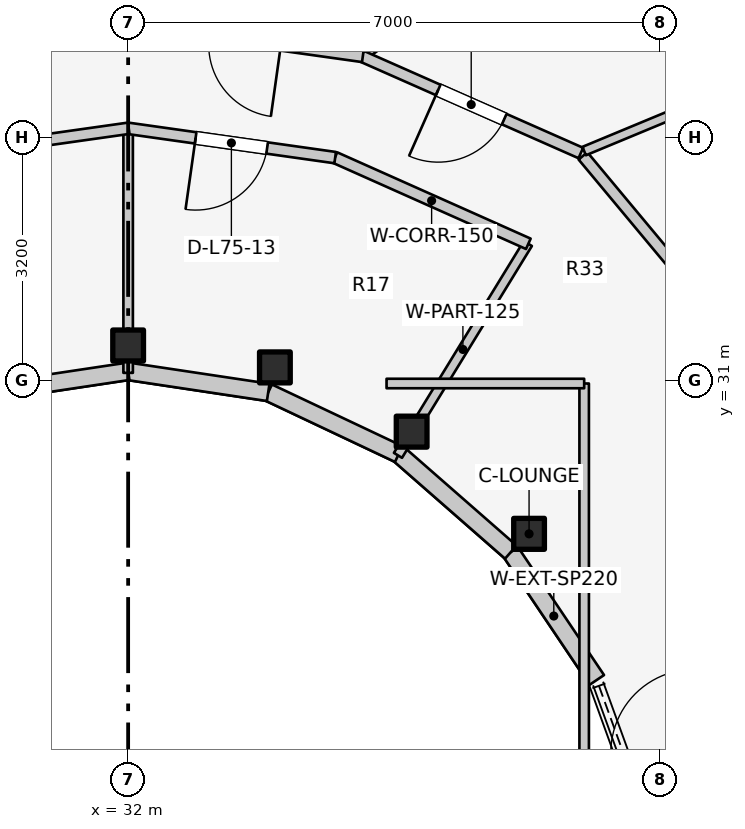
"""IFC4 building model, lengths in metres.
Left out: names, types, materials, properties, quantities, classifications, styles, units other than length and angle.
Written with IfcOpenShell. Run it as: python <this file> out.ifc"""

import sys

from ifc_helpers import new_model, si_unit, direction, frame, frame_2d, origin, origin_2d, place, context, subcontext, project, spatial, rectangle, i_section, extrude, element, fill, save


model = new_model("IFC4")
c1 = context("Model", 3, precision=1e-05, world=origin(), true_north=direction((0.0, 1.0)))
c2 = subcontext(c1, "Body", "Model", "MODEL_VIEW")
j1 = project(units=[si_unit("LENGTHUNIT", "METRE"), si_unit("PLANEANGLEUNIT", "RADIAN")], contexts=[c1])
p1 = place(None, origin())
s1 = spatial("IfcSite", under=j1, at=p1, CompositionType="ELEMENT")
p2 = place(p1, origin())
s2 = spatial("IfcBuilding", under=s1, at=p2, CompositionType="ELEMENT")
p3 = place(p2, frame((0.0, 0.0, 246.0)))
s3 = spatial("IfcBuildingStorey", under=s2, at=p3, CompositionType="ELEMENT", Elevation=246.0)
for number, where, z_axis, x_axis in (
    (1, (37.275, 28.982, 0.0), (0.0, 0.0, 1.0), (1.0, 0.0, 0.0)),
    (2, (35.73, 30.327, 0.0), (0.0, 0.0, 1.0), (1.0, 0.0, 0.0)),
    (3, (33.931, 31.172, 0.0), (0.0, 0.0, 1.0), (1.0, 0.0, 0.0)),
    (4, (32.0, 31.46, 0.0), (0.0, 0.0, 1.0), (1.0, 0.0, 0.0)),
):
    element("IfcColumn", number, at=place(p3, frame(where, z_axis=z_axis, x_axis=x_axis)), inside=s3, PredefinedType="COLUMN", context=c2, shape_type="SweptSolid", body=[
        extrude(i_section(OverallWidth=0.404, OverallDepth=0.407, WebThickness=0.027, FlangeThickness=0.044, FilletRadius=0.025, at=origin_2d()), origin(), (0.0, 0.0, 1.0), 3.6),
    ])
p4 = place(p3, frame((38.166, 27.06, 0.0), z_axis=(0.0, 0.0, 1.0), x_axis=(-0.558197800898, 0.829707909492, 0.0)))
e5 = element("IfcWall", 5, at=p4, inside=s3, PredefinedType="STANDARD", context=c2, shape_type="SweptSolid", body=[
    extrude(rectangle(XDim=2.027, YDim=0.23, at=frame_2d((1.013, 0.0))), origin(), (0.0, 0.0, 1.0), 2.6),
])
p5 = place(p3, frame((37.035, 28.742, 0.0), z_axis=(0.0, 0.0, 1.0), x_axis=(-0.752576694707, 0.658504607869, 0.0)))
e6 = element("IfcWall", 6, at=p5, inside=s3, PredefinedType="STANDARD", context=c2, shape_type="SweptSolid", body=[
    extrude(rectangle(XDim=1.959, YDim=0.23, at=frame_2d((0.98, 0.0))), origin(), (0.0, 0.0, 1.0), 2.6),
])
p6 = place(p3, frame((35.56, 30.032, 0.0), z_axis=(0.0, 0.0, 1.0), x_axis=(-0.904179699603, 0.427152280606, 0.0)))
e7 = element("IfcWall", 7, at=p6, inside=s3, PredefinedType="STANDARD", context=c2, shape_type="SweptSolid", body=[
    extrude(rectangle(XDim=1.899, YDim=0.23, at=frame_2d((0.95, 0.0))), origin(), (0.0, 0.0, 1.0), 2.6),
])
for number, where, z_axis, x_axis in (
    (8, (33.843, 30.843, 0.0), (0.0, 0.0, 1.0), (-0.989, 0.149, 0.0)),
    (9, (32.0, 31.12, 0.0), (0.0, 0.0, 1.0), (-0.989, -0.149, 0.0)),
):
    element("IfcWall", number, at=place(p3, frame(where, z_axis=z_axis, x_axis=x_axis)), inside=s3, PredefinedType="STANDARD", context=c2, shape_type="SweptSolid", body=[
        extrude(rectangle(XDim=1.864, YDim=0.23, at=frame_2d((0.932, 0.0))), origin(), (0.0, 0.0, 1.0), 2.6),
    ])
p7 = place(p3, frame((35.55, 30.015, 0.0), z_axis=(0.0, 0.0, 1.0), x_axis=(0.522763432117, 0.852477796802, 0.0)))
e10 = element("IfcWall", 10, at=p7, inside=s3, PredefinedType="PARTITIONING", context=c2, shape_type="SweptSolid", body=[
    extrude(rectangle(XDim=3.269, YDim=0.125, at=frame_2d((1.635, 0.0))), origin(), (0.0, 0.0, 1.0), 2.672),
])
p8 = place(p3, frame((32.0, 31.1, 0.0), z_axis=(0.0, 0.0, 1.0), x_axis=(0.0, 1.0, 0.0)))
e11 = element("IfcWall", 11, at=p8, inside=s3, PredefinedType="PARTITIONING", context=c2, shape_type="SweptSolid", body=[
    extrude(rectangle(XDim=3.218, YDim=0.125, at=frame_2d((1.609, 0.0))), origin(), (0.0, 0.0, 1.0), 2.672),
])
p9 = place(p3, frame((37.265, 32.798, 0.0), z_axis=(0.0, 0.0, 1.0), x_axis=(-0.913254317828, 0.407389924971, 0.0)))
e12 = element("IfcWall", 12, at=p9, inside=s3, PredefinedType="PARTITIONING", context=c2, shape_type="SweptSolid", body=[
    extrude(rectangle(XDim=2.787, YDim=0.15, at=frame_2d((1.393, 0.0))), origin(), (0.0, 0.0, 1.0), 2.823),
])
p10 = place(p3, frame((34.724, 33.932, 0.0), z_axis=(0.0, 0.0, 1.0), x_axis=(-0.990150268487, 0.140008734782, 0.0)))
e13 = element("IfcWall", 13, at=p10, inside=s3, PredefinedType="PARTITIONING", context=c2, shape_type="SweptSolid", body=[
    extrude(rectangle(XDim=2.759, YDim=0.15, at=frame_2d((1.379, 0.0))), origin(), (0.0, 0.0, 1.0), 2.823),
])
p11 = place(p10, frame((0.904, 0.0, 0.0)))
e14 = element("IfcOpeningElement", 14, at=p11, cuts=e13, PredefinedType="OPENING", context=c2, shape_type="SweptSolid", body=[
    extrude(rectangle(XDim=0.95, YDim=2.1, at=frame_2d((0.475, 1.05))), frame((0.0, 0.085, 0.0), z_axis=(0.0, -1.0, 0.0), x_axis=(1.0, 0.0, 0.0)), (0.0, 0.0, 1.0), 0.17),
])
p12 = place(p3, frame((32.007, 34.318, 0.0), z_axis=(0.0, 0.0, 1.0), x_axis=(-0.990150268487, -0.140008734782, 0.0)))
e15 = element("IfcWall", 15, at=p12, inside=s3, PredefinedType="PARTITIONING", context=c2, shape_type="SweptSolid", body=[
    extrude(rectangle(XDim=2.759, YDim=0.15, at=frame_2d((1.379, 0.0))), origin(), (0.0, 0.0, 1.0), 2.823),
])
p13 = place(p3, frame((38.0, 25.8, 0.0), z_axis=(0.0, 0.0, 1.0), x_axis=(0.0, 1.0, 0.0)))
e16 = element("IfcWall", 16, at=p13, inside=s3, PredefinedType="PARTITIONING", context=c2, shape_type="SweptSolid", body=[
    extrude(rectangle(XDim=5.16, YDim=0.125, at=frame_2d((2.58, 0.0))), origin(), (0.0, 0.0, 1.0), 2.672),
])
p14 = place(p3, frame((35.4, 30.96, 0.0), z_axis=(0.0, 0.0, 1.0), x_axis=(1.0, 0.0, 0.0)))
e17 = element("IfcWall", 17, at=p14, inside=s3, PredefinedType="PARTITIONING", context=c2, shape_type="SweptSolid", body=[
    extrude(rectangle(XDim=2.6, YDim=0.125, at=frame_2d((1.3, 0.0))), origin(), (0.0, 0.0, 1.0), 2.816),
])
p15 = place(p3, frame((37.984, 33.955, 0.0), z_axis=(0.0, 0.0, 1.0), x_axis=(0.64030392053, -0.76812166312, 0.0)))
e18 = element("IfcWall", 18, at=p15, inside=s3, PredefinedType="PARTITIONING", context=c2, shape_type="SweptSolid", body=[
    extrude(rectangle(XDim=2.21, YDim=0.15, at=frame_2d((1.105, 0.0))), origin(), (0.0, 0.0, 1.0), 2.816),
])
p16 = place(p3, frame((38.0, 34.018, 0.0), z_axis=(0.0, 0.0, 1.0), x_axis=(0.92349333748, 0.383614462228, 0.0)))
e19 = element("IfcWall", 19, at=p16, inside=s3, PredefinedType="MOVABLE", context=c2, shape_type="SweptSolid", body=[
    extrude(rectangle(XDim=5.907, YDim=0.12, at=frame_2d((2.954, 0.0))), origin(), (0.0, 0.0, 1.0), 2.66),
])
p17 = place(p3, frame((35.124, 35.297, 0.0), z_axis=(0.0, 0.0, 1.0), x_axis=(0.811745719064, 0.584011033783, 0.0)))
e20 = element("IfcWall", 20, at=p17, inside=s3, PredefinedType="MOVABLE", context=c2, shape_type="SweptSolid", body=[
    extrude(rectangle(XDim=4.534, YDim=0.12, at=frame_2d((2.267, 0.0))), origin(), (0.0, 0.0, 1.0), 2.66),
])
p18 = place(p3, frame((37.956, 33.992, 0.0), z_axis=(0.0, 0.0, 1.0), x_axis=(-0.914642679993, 0.404263240891, 0.0)))
e21 = element("IfcWall", 21, at=p18, inside=s3, PredefinedType="PARTITIONING", context=c2, shape_type="SweptSolid", body=[
    extrude(rectangle(XDim=3.154, YDim=0.15, at=frame_2d((1.577, 0.0))), origin(), (0.0, 0.0, 1.0), 2.823),
])
p19 = place(p18, frame((1.102, 0.0, 0.0)))
e22 = element("IfcOpeningElement", 22, at=p19, cuts=e21, PredefinedType="OPENING", context=c2, shape_type="SweptSolid", body=[
    extrude(rectangle(XDim=0.95, YDim=2.1, at=frame_2d((0.475, 1.05))), frame((0.0, 0.085, 0.0), z_axis=(0.0, -1.0, 0.0), x_axis=(1.0, 0.0, 0.0)), (0.0, 0.0, 1.0), 0.17),
])
p20 = place(p3, frame((35.087, 35.263, 0.0), z_axis=(0.0, 0.0, 1.0), x_axis=(-0.990268690673, 0.139168675614, 0.0)))
e23 = element("IfcWall", 23, at=p20, inside=s3, PredefinedType="PARTITIONING", context=c2, shape_type="SweptSolid", body=[
    extrude(rectangle(XDim=3.126, YDim=0.15, at=frame_2d((1.563, 0.0))), origin(), (0.0, 0.0, 1.0), 2.823),
])
p21 = place(p20, frame((1.088, 0.0, 0.0)))
e24 = element("IfcOpeningElement", 24, at=p21, cuts=e23, PredefinedType="OPENING", context=c2, shape_type="SweptSolid", body=[
    extrude(rectangle(XDim=0.95, YDim=2.1, at=frame_2d((0.475, 1.05))), frame((0.0, 0.085, 0.0), z_axis=(0.0, -1.0, 0.0), x_axis=(1.0, 0.0, 0.0)), (0.0, 0.0, 1.0), 0.17),
])
p22 = place(p3, frame((32.008, 35.698, 0.0), z_axis=(0.0, 0.0, 1.0), x_axis=(-0.990268690673, -0.139168675614, 0.0)))
e25 = element("IfcWall", 25, at=p22, inside=s3, PredefinedType="PARTITIONING", context=c2, shape_type="SweptSolid", body=[
    extrude(rectangle(XDim=3.126, YDim=0.15, at=frame_2d((1.563, 0.0))), origin(), (0.0, 0.0, 1.0), 2.823),
])
p23 = place(p22, frame((1.088, 0.0, 0.0)))
e26 = element("IfcOpeningElement", 26, at=p23, cuts=e25, PredefinedType="OPENING", context=c2, shape_type="SweptSolid", body=[
    extrude(rectangle(XDim=0.95, YDim=2.1, at=frame_2d((0.475, 1.05))), frame((0.0, 0.085, 0.0), z_axis=(0.0, -1.0, 0.0), x_axis=(1.0, 0.0, 0.0)), (0.0, 0.0, 1.0), 0.17),
])
p24 = place(p11, origin())
e27 = element("IfcDoor", 27, at=p24, inside=s3, OperationType="SINGLE_SWING_RIGHT", PredefinedType="DOOR", context=c2, shape_type="SweptSolid", body=[
    extrude(rectangle(XDim=0.95, YDim=2.1, at=frame_2d((0.475, 1.05))), frame((0.0, 0.025, 0.0), z_axis=(0.0, -1.0, 0.0), x_axis=(1.0, 0.0, 0.0)), (0.0, 0.0, 1.0), 0.05),
])
fill(e14, e27)
p25 = place(p19, origin())
e28 = element("IfcDoor", 28, at=p25, inside=s3, OperationType="SINGLE_SWING_RIGHT", PredefinedType="DOOR", context=c2, shape_type="SweptSolid", body=[
    extrude(rectangle(XDim=0.95, YDim=2.1, at=frame_2d((0.475, 1.05))), frame((0.0, 0.025, 0.0), z_axis=(0.0, -1.0, 0.0), x_axis=(1.0, 0.0, 0.0)), (0.0, 0.0, 1.0), 0.05),
])
fill(e22, e28)
save(model, sys.argv[1])
